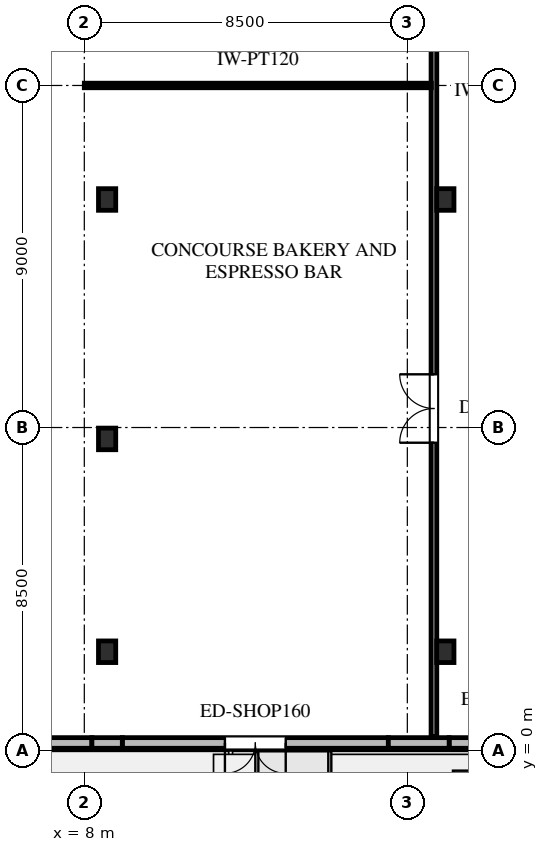
"""IFC4 building model, lengths in metres.
Left out: names, types, materials, properties, quantities, classifications, styles, units other than length and angle.
Written with IfcOpenShell. Run it as: python <this file> out.ifc"""

import sys

from ifc_helpers import new_model, si_unit, direction, frame, frame_2d, origin, origin_2d, place, context, subcontext, project, spatial, rectangle, i_section, extrude, element, fill, save


model = new_model("IFC4")
c1 = context("Model", 3, precision=1e-05, world=origin(), true_north=direction((0.0, 1.0)))
c2 = subcontext(c1, "Body", "Model", "MODEL_VIEW")
j1 = project(units=[si_unit("LENGTHUNIT", "METRE"), si_unit("PLANEANGLEUNIT", "RADIAN")], contexts=[c1])
p1 = place(None, origin())
s1 = spatial("IfcSite", under=j1, at=p1, CompositionType="ELEMENT")
p2 = place(p1, origin())
s2 = spatial("IfcBuilding", under=s1, at=p2, CompositionType="ELEMENT")
p3 = place(p2, origin())
s3 = spatial("IfcBuildingStorey", under=s2, at=p3, CompositionType="ELEMENT", Elevation=0.0)
for number, where, z_axis, x_axis in (
    (1, (8.6, 2.6, 0.0), (0.0, 0.0, 1.0), (1.0, 0.0, 0.0)),
    (2, (17.5, 2.6, 0.0), (0.0, 0.0, 1.0), (1.0, 0.0, 0.0)),
    (3, (8.6, 8.2, 0.0), (0.0, 0.0, 1.0), (1.0, 0.0, 0.0)),
    (4, (8.6, 14.5, 0.0), (0.0, 0.0, 1.0), (1.0, 0.0, 0.0)),
    (5, (17.5, 14.5, 0.0), (0.0, 0.0, 1.0), (1.0, 0.0, 0.0)),
):
    element("IfcColumn", number, at=place(p3, frame(where, z_axis=z_axis, x_axis=x_axis)), inside=s3, PredefinedType="COLUMN", context=c2, shape_type="SweptSolid", body=[
        extrude(i_section(OverallWidth=0.454, OverallDepth=0.569, WebThickness=0.078, FlangeThickness=0.125, FilletRadius=0.03, at=origin_2d()), origin(), (0.0, 0.0, 1.0), 5.4),
    ])
p4 = place(p3, frame((8.2, 0.2, 0.0), z_axis=(0.0, 0.0, 1.0), x_axis=(-1.0, 0.0, 0.0)))
e6 = element("IfcWall", 6, at=p4, inside=s3, PredefinedType="STANDARD", context=c2, shape_type="SweptSolid", body=[
    extrude(rectangle(XDim=7.8, YDim=0.28, at=frame_2d((3.9, 0.0))), origin(), (0.0, 0.0, 1.0), 5.13),
])
p5 = place(p4, frame((1.2, 0.0, 0.0)))
e7 = element("IfcOpeningElement", 7, at=p5, cuts=e6, PredefinedType="OPENING", context=c2, shape_type="SweptSolid", body=[
    extrude(rectangle(XDim=5.6, YDim=3.2, at=frame_2d((2.8, 1.6))), frame((0.0, 0.15, 0.0), z_axis=(0.0, -1.0, 0.0), x_axis=(1.0, 0.0, 0.0)), (0.0, 0.0, 1.0), 0.3),
])
p6 = place(p3, frame((16.0, 0.2, 0.0), z_axis=(0.0, 0.0, 1.0), x_axis=(-1.0, 0.0, 0.0)))
e8 = element("IfcWall", 8, at=p6, inside=s3, PredefinedType="STANDARD", context=c2, shape_type="SweptSolid", body=[
    extrude(rectangle(XDim=7.0, YDim=0.28, at=frame_2d((3.5, 0.0))), origin(), (0.0, 0.0, 1.0), 5.13),
])
p7 = place(p6, frame((2.7, 0.0, 0.0)))
e9 = element("IfcOpeningElement", 9, at=p7, cuts=e8, PredefinedType="OPENING", context=c2, shape_type="SweptSolid", body=[
    extrude(rectangle(XDim=1.6, YDim=2.4, at=frame_2d((0.8, 1.2))), frame((0.0, 0.15, 0.0), z_axis=(0.0, -1.0, 0.0), x_axis=(1.0, 0.0, 0.0)), (0.0, 0.0, 1.0), 0.3),
])
p8 = place(p3, frame((23.8, 0.2, 0.0), z_axis=(0.0, 0.0, 1.0), x_axis=(-1.0, 0.0, 0.0)))
e10 = element("IfcWall", 10, at=p8, inside=s3, PredefinedType="STANDARD", context=c2, shape_type="SweptSolid", body=[
    extrude(rectangle(XDim=6.2, YDim=0.28, at=frame_2d((3.1, 0.0))), origin(), (0.0, 0.0, 1.0), 5.13),
])
p9 = place(p8, frame((0.7, 0.0, 0.0)))
e11 = element("IfcOpeningElement", 11, at=p9, cuts=e10, PredefinedType="OPENING", context=c2, shape_type="SweptSolid", body=[
    extrude(rectangle(XDim=2.0, YDim=2.4, at=frame_2d((1.0, 1.2))), frame((0.0, 0.15, 0.0), z_axis=(0.0, -1.0, 0.0), x_axis=(1.0, 0.0, 0.0)), (0.0, 0.0, 1.0), 0.3),
])
p10 = place(p8, frame((3.5, 0.0, 0.0)))
e12 = element("IfcOpeningElement", 12, at=p10, cuts=e10, PredefinedType="OPENING", context=c2, shape_type="SweptSolid", body=[
    extrude(rectangle(XDim=2.0, YDim=2.4, at=frame_2d((1.0, 1.2))), frame((0.0, 0.15, 0.0), z_axis=(0.0, -1.0, 0.0), x_axis=(1.0, 0.0, 0.0)), (0.0, 0.0, 1.0), 0.3),
])
p11 = place(p3, frame((9.0, 0.2, 0.0), z_axis=(0.0, 0.0, 1.0), x_axis=(-1.0, 0.0, 0.0)))
e13 = element("IfcWall", 13, at=p11, inside=s3, PredefinedType="STANDARD", context=c2, shape_type="SweptSolid", body=[
    extrude(rectangle(XDim=0.8, YDim=0.28, at=frame_2d((0.4, 0.0))), origin(), (0.0, 0.0, 1.0), 5.13),
])
p12 = place(p3, frame((17.6, 0.2, 0.0), z_axis=(0.0, 0.0, 1.0), x_axis=(-1.0, 0.0, 0.0)))
e14 = element("IfcWall", 14, at=p12, inside=s3, PredefinedType="STANDARD", context=c2, shape_type="SweptSolid", body=[
    extrude(rectangle(XDim=1.6, YDim=0.28, at=frame_2d((0.8, 0.0))), origin(), (0.0, 0.0, 1.0), 5.13),
])
p13 = place(p3, frame((17.2, 0.365, 0.0), z_axis=(0.0, 0.0, 1.0), x_axis=(0.0, 1.0, 0.0)))
e15 = element("IfcWall", 15, at=p13, inside=s3, PredefinedType="PARTITIONING", context=c2, shape_type="SweptSolid", body=[
    extrude(rectangle(XDim=33.967, YDim=0.15, at=frame_2d((16.983, 0.0))), origin(), (0.0, 0.0, 1.0), 4.182),
])
p14 = place(p13, frame((7.735, 0.0, 0.0)))
e16 = element("IfcOpeningElement", 16, at=p14, cuts=e15, PredefinedType="OPENING", context=c2, shape_type="SweptSolid", body=[
    extrude(rectangle(XDim=1.8, YDim=2.2, at=frame_2d((0.9, 1.1))), frame((0.0, 0.085, 0.0), z_axis=(0.0, -1.0, 0.0), x_axis=(1.0, 0.0, 0.0)), (0.0, 0.0, 1.0), 0.17),
])
p15 = place(p13, frame((21.944, 0.0, 0.0)))
e17 = element("IfcOpeningElement", 17, at=p15, cuts=e15, PredefinedType="OPENING", context=c2, shape_type="SweptSolid", body=[
    extrude(rectangle(XDim=1.8, YDim=2.2, at=frame_2d((0.9, 1.1))), frame((0.0, 0.085, 0.0), z_axis=(0.0, -1.0, 0.0), x_axis=(1.0, 0.0, 0.0)), (0.0, 0.0, 1.0), 0.17),
])
p16 = place(p3, frame((8.0, 17.5, 0.0), z_axis=(0.0, 0.0, 1.0), x_axis=(1.0, 0.0, 0.0)))
e18 = element("IfcWall", 18, at=p16, inside=s3, PredefinedType="PARTITIONING", context=c2, shape_type="SweptSolid", body=[
    extrude(rectangle(XDim=9.132, YDim=0.12, at=frame_2d((4.566, 0.0))), origin(), (0.0, 0.0, 1.0), 4.182),
])
p17 = place(p3, frame((0.0, 0.0, 4.6)))
p18 = place(p17, frame((18.25, -1.08, 0.0)))
p19 = place(p18, frame((0.0, 0.0, 0.11)))
e19 = element("IfcDoor", 19, at=p19, inside=s3, OperationType="SINGLE_SWING_LEFT", PredefinedType="TRAPDOOR", context=c2, shape_type="SweptSolid", body=[
    extrude(rectangle(XDim=1.1, YDim=1.1, at=origin_2d()), origin(), (0.0, 0.0, 1.0), 0.05),
])
p20 = place(p7, origin())
e20 = element("IfcDoor", 20, at=p20, inside=s3, OperationType="DOUBLE_DOOR_SINGLE_SWING", PredefinedType="DOOR", context=c2, shape_type="SweptSolid", body=[
    extrude(rectangle(XDim=1.6, YDim=2.4, at=frame_2d((0.8, 1.2))), frame((0.0, 0.025, 0.0), z_axis=(0.0, -1.0, 0.0), x_axis=(1.0, 0.0, 0.0)), (0.0, 0.0, 1.0), 0.05),
])
fill(e9, e20)
p21 = place(p14, origin())
e21 = element("IfcDoor", 21, at=p21, inside=s3, OperationType="DOUBLE_DOOR_SINGLE_SWING", PredefinedType="DOOR", context=c2, shape_type="SweptSolid", body=[
    extrude(rectangle(XDim=1.8, YDim=2.2, at=frame_2d((0.9, 1.1))), frame((0.0, 0.025, 0.0), z_axis=(0.0, -1.0, 0.0), x_axis=(1.0, 0.0, 0.0)), (0.0, 0.0, 1.0), 0.05),
])
fill(e16, e21)
save(model, sys.argv[1])
